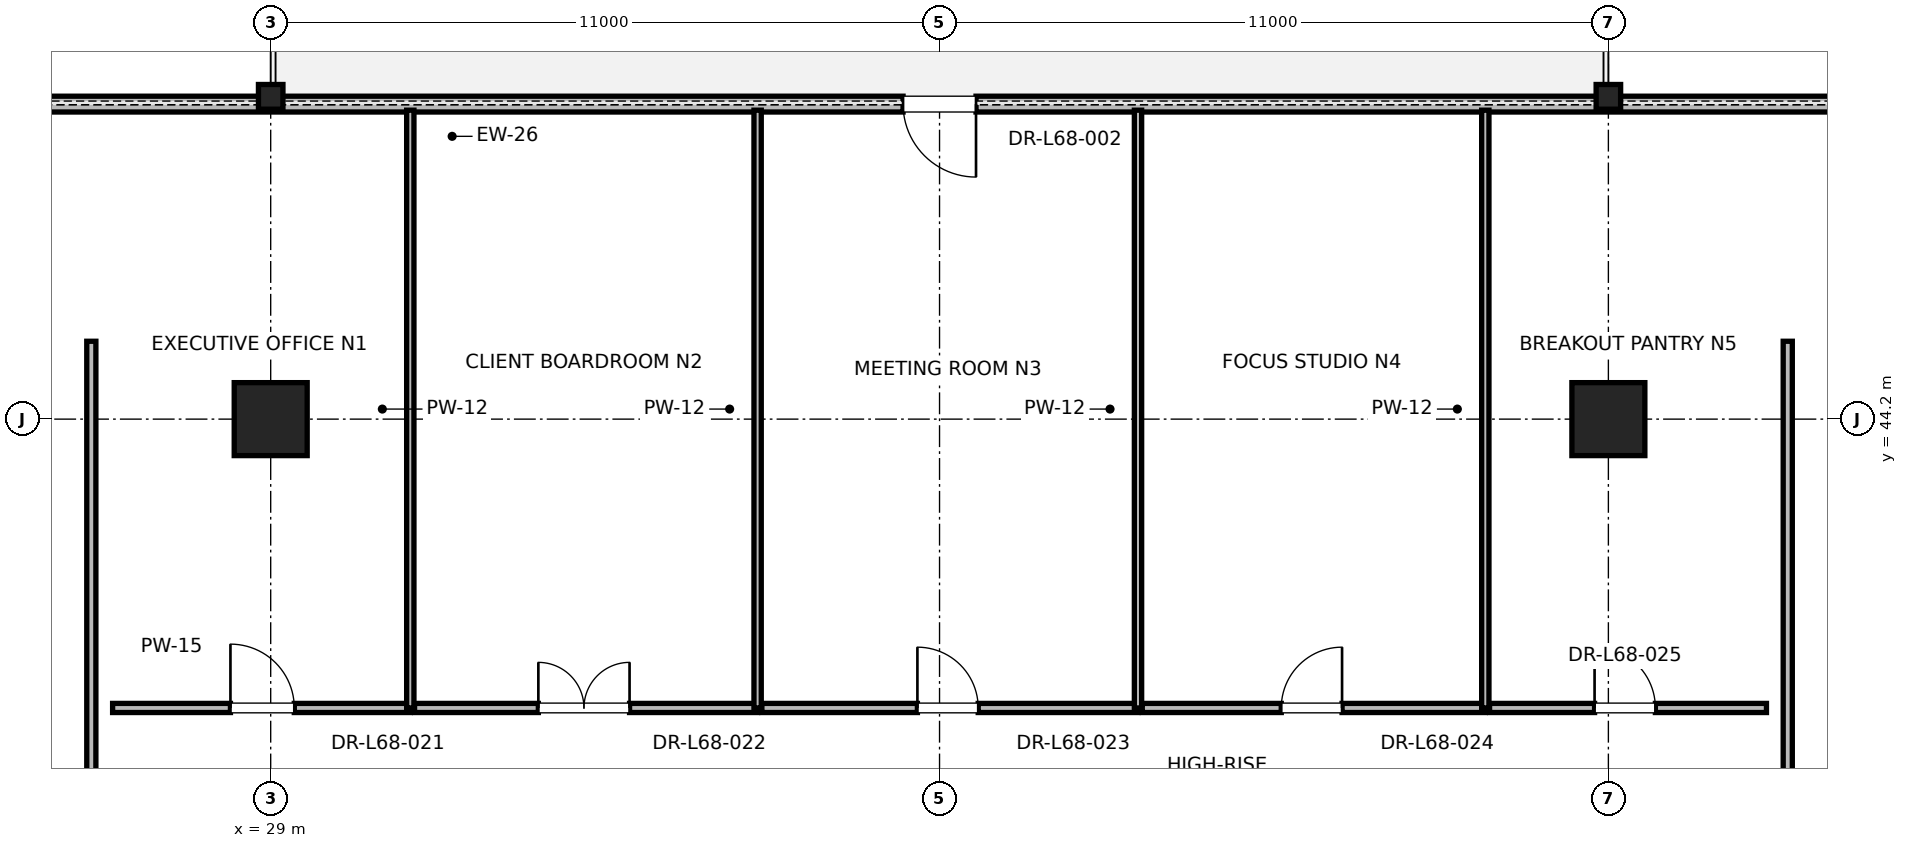
"""IFC4 building model, lengths in metres.
Left out: names, types, materials, properties, quantities, classifications, styles, units other than length and angle.
Written with IfcOpenShell. Run it as: python <this file> out.ifc"""

import sys

from ifc_helpers import new_model, si_unit, direction, frame, frame_2d, origin, origin_2d, place, context, subcontext, project, spatial, rectangle, i_section, extrude, element, fill, save


model = new_model("IFC4")
c1 = context("Model", 3, precision=1e-05, world=origin(), true_north=direction((0.0, 1.0)))
c2 = subcontext(c1, "Body", "Model", "MODEL_VIEW")
j1 = project(units=[si_unit("LENGTHUNIT", "METRE"), si_unit("PLANEANGLEUNIT", "RADIAN")], contexts=[c1])
p1 = place(None, origin())
s1 = spatial("IfcSite", under=j1, at=p1, CompositionType="ELEMENT")
p2 = place(p1, origin())
s2 = spatial("IfcBuilding", under=s1, at=p2, CompositionType="ELEMENT")
p3 = place(p2, frame((0.0, 0.0, 291.2)))
s3 = spatial("IfcBuildingStorey", under=s2, at=p3, CompositionType="ELEMENT", Elevation=291.2)
for number, where, z_axis, x_axis in (
    (1, (29.0, 44.2, 0.0), (0.0, 0.0, 1.0), (1.0, 0.0, 0.0)),
    (2, (51.0, 44.2, 0.0), (0.0, 0.0, 1.0), (1.0, 0.0, 0.0)),
):
    element("IfcColumn", number, at=place(p3, frame(where, z_axis=z_axis, x_axis=x_axis)), inside=s3, PredefinedType="COLUMN", context=c2, shape_type="SweptSolid", body=[
        extrude(rectangle(XDim=1.2, YDim=1.2, at=origin_2d()), origin(), (0.0, 0.0, 1.0), 4.0),
    ])
for number, where, z_axis, x_axis in (
    (3, (29.0, 49.5, 0.0), (0.0, 0.0, 1.0), (1.0, 0.0, 0.0)),
    (4, (51.0, 49.5, 0.0), (0.0, 0.0, 1.0), (1.0, 0.0, 0.0)),
):
    element("IfcColumn", number, at=place(p3, frame(where, z_axis=z_axis, x_axis=x_axis)), inside=s3, PredefinedType="COLUMN", context=c2, shape_type="SweptSolid", body=[
        extrude(i_section(OverallWidth=0.403, OverallDepth=0.406, WebThickness=0.027, FlangeThickness=0.043, FilletRadius=0.015, at=origin_2d()), origin(), (0.0, 0.0, 1.0), 4.0),
    ])
p4 = place(p3, frame((61.232, 49.381, 0.0), z_axis=(0.0, 0.0, 1.0), x_axis=(-1.0, 0.0, 0.0)))
e5 = element("IfcWall", 5, at=p4, inside=s3, PredefinedType="PARAPET", context=c2, shape_type="SweptSolid", body=[
    extrude(rectangle(XDim=42.463, YDim=0.26, at=frame_2d((21.232, 0.0))), origin(), (0.0, 0.0, 1.0), 2.753),
])
p5 = place(p4, frame((4.2, 0.0, 0.85)))
e6 = element("IfcOpeningElement", 6, at=p5, cuts=e5, PredefinedType="OPENING", context=c2, shape_type="SweptSolid", body=[
    extrude(rectangle(XDim=1.6, YDim=2.1, at=frame_2d((0.8, 1.05))), frame((0.0, 0.13, 0.0), z_axis=(0.0, -1.0, 0.0), x_axis=(1.0, 0.0, 0.0)), (0.0, 0.0, 1.0), 0.26),
])
p6 = place(p4, frame((20.632, 0.0, 0.0)))
e7 = element("IfcOpeningElement", 7, at=p6, cuts=e5, PredefinedType="OPENING", context=c2, shape_type="SweptSolid", body=[
    extrude(rectangle(XDim=1.2, YDim=2.2, at=frame_2d((0.6, 1.1))), frame((0.0, 0.13, 0.0), z_axis=(0.0, -1.0, 0.0), x_axis=(1.0, 0.0, 0.0)), (0.0, 0.0, 1.0), 0.26),
])
p7 = place(p4, frame((36.663, 0.0, 0.85)))
e8 = element("IfcOpeningElement", 8, at=p7, cuts=e5, PredefinedType="OPENING", context=c2, shape_type="SweptSolid", body=[
    extrude(rectangle(XDim=1.6, YDim=2.1, at=frame_2d((0.8, 1.05))), frame((0.0, 0.13, 0.0), z_axis=(0.0, -1.0, 0.0), x_axis=(1.0, 0.0, 0.0)), (0.0, 0.0, 1.0), 0.26),
])
p8 = place(p3, frame((26.4, 39.45, 0.0), z_axis=(0.0, 0.0, 1.0), x_axis=(1.0, 0.0, 0.0)))
e9 = element("IfcWall", 9, at=p8, inside=s3, PredefinedType="PARTITIONING", context=c2, shape_type="SweptSolid", body=[
    extrude(rectangle(XDim=4.896, YDim=0.15, at=frame_2d((2.448, 0.0))), origin(), (0.0, 0.0, 1.0), 2.753),
])
p9 = place(p8, frame((1.938, 0.0, 0.0)))
e10 = element("IfcOpeningElement", 10, at=p9, cuts=e9, PredefinedType="OPENING", context=c2, shape_type="SweptSolid", body=[
    extrude(rectangle(XDim=1.05, YDim=2.2, at=frame_2d((0.525, 1.1))), frame((0.0, 0.075, 0.0), z_axis=(0.0, -1.0, 0.0), x_axis=(1.0, 0.0, 0.0)), (0.0, 0.0, 1.0), 0.15),
])
p10 = place(p3, frame((31.296, 39.45, 0.0), z_axis=(0.0, 0.0, 1.0), x_axis=(0.0, 1.0, 0.0)))
e11 = element("IfcWall", 11, at=p10, inside=s3, PredefinedType="PARTITIONING", context=c2, shape_type="SweptSolid", body=[
    extrude(rectangle(XDim=9.831, YDim=0.12, at=frame_2d((4.915, 0.0))), origin(), (0.0, 0.0, 1.0), 2.33),
])
p11 = place(p3, frame((31.366, 39.45, 0.0), z_axis=(0.0, 0.0, 1.0), x_axis=(1.0, 0.0, 0.0)))
e12 = element("IfcWall", 12, at=p11, inside=s3, PredefinedType="PARTITIONING", context=c2, shape_type="SweptSolid", body=[
    extrude(rectangle(XDim=5.642, YDim=0.15, at=frame_2d((2.821, 0.0))), origin(), (0.0, 0.0, 1.0), 2.85),
])
p12 = place(p11, frame((2.036, 0.0, 0.0)))
e13 = element("IfcOpeningElement", 13, at=p12, cuts=e12, PredefinedType="OPENING", context=c2, shape_type="SweptSolid", body=[
    extrude(rectangle(XDim=1.5, YDim=2.25, at=frame_2d((0.75, 1.125))), frame((0.0, 0.075, 0.0), z_axis=(0.0, -1.0, 0.0), x_axis=(1.0, 0.0, 0.0)), (0.0, 0.0, 1.0), 0.15),
])
p13 = place(p3, frame((37.008, 39.45, 0.0), z_axis=(0.0, 0.0, 1.0), x_axis=(0.0, 1.0, 0.0)))
e14 = element("IfcWall", 14, at=p13, inside=s3, PredefinedType="PARTITIONING", context=c2, shape_type="SweptSolid", body=[
    extrude(rectangle(XDim=9.831, YDim=0.12, at=frame_2d((4.915, 0.0))), origin(), (0.0, 0.0, 1.0), 2.33),
])
p14 = place(p3, frame((37.078, 39.45, 0.0), z_axis=(0.0, 0.0, 1.0), x_axis=(1.0, 0.0, 0.0)))
e15 = element("IfcWall", 15, at=p14, inside=s3, PredefinedType="PARTITIONING", context=c2, shape_type="SweptSolid", body=[
    extrude(rectangle(XDim=6.186, YDim=0.15, at=frame_2d((3.093, 0.0))), origin(), (0.0, 0.0, 1.0), 2.85),
])
p15 = place(p14, frame((2.558, 0.0, 0.0)))
e16 = element("IfcOpeningElement", 16, at=p15, cuts=e15, PredefinedType="OPENING", context=c2, shape_type="SweptSolid", body=[
    extrude(rectangle(XDim=1.0, YDim=2.15, at=frame_2d((0.5, 1.075))), frame((0.0, 0.075, 0.0), z_axis=(0.0, -1.0, 0.0), x_axis=(1.0, 0.0, 0.0)), (0.0, 0.0, 1.0), 0.15),
])
p16 = place(p3, frame((43.264, 39.45, 0.0), z_axis=(0.0, 0.0, 1.0), x_axis=(0.0, 1.0, 0.0)))
e17 = element("IfcWall", 17, at=p16, inside=s3, PredefinedType="PARTITIONING", context=c2, shape_type="SweptSolid", body=[
    extrude(rectangle(XDim=9.831, YDim=0.12, at=frame_2d((4.915, 0.0))), origin(), (0.0, 0.0, 1.0), 2.33),
])
p17 = place(p3, frame((43.334, 39.45, 0.0), z_axis=(0.0, 0.0, 1.0), x_axis=(1.0, 0.0, 0.0)))
e18 = element("IfcWall", 18, at=p17, inside=s3, PredefinedType="PARTITIONING", context=c2, shape_type="SweptSolid", body=[
    extrude(rectangle(XDim=5.642, YDim=0.15, at=frame_2d((2.821, 0.0))), origin(), (0.0, 0.0, 1.0), 2.85),
])
p18 = place(p17, frame((2.286, 0.0, 0.0)))
e19 = element("IfcOpeningElement", 19, at=p18, cuts=e18, PredefinedType="OPENING", context=c2, shape_type="SweptSolid", body=[
    extrude(rectangle(XDim=1.0, YDim=2.15, at=frame_2d((0.5, 1.075))), frame((0.0, 0.075, 0.0), z_axis=(0.0, -1.0, 0.0), x_axis=(1.0, 0.0, 0.0)), (0.0, 0.0, 1.0), 0.15),
])
p19 = place(p3, frame((48.976, 39.45, 0.0), z_axis=(0.0, 0.0, 1.0), x_axis=(0.0, 1.0, 0.0)))
e20 = element("IfcWall", 20, at=p19, inside=s3, PredefinedType="PARTITIONING", context=c2, shape_type="SweptSolid", body=[
    extrude(rectangle(XDim=9.831, YDim=0.12, at=frame_2d((4.915, 0.0))), origin(), (0.0, 0.0, 1.0), 2.33),
])
p20 = place(p3, frame((49.046, 39.45, 0.0), z_axis=(0.0, 0.0, 1.0), x_axis=(1.0, 0.0, 0.0)))
e21 = element("IfcWall", 21, at=p20, inside=s3, PredefinedType="PARTITIONING", context=c2, shape_type="SweptSolid", body=[
    extrude(rectangle(XDim=4.554, YDim=0.15, at=frame_2d((2.277, 0.0))), origin(), (0.0, 0.0, 1.0), 2.753),
])
p21 = place(p20, frame((1.727, 0.0, 0.0)))
e22 = element("IfcOpeningElement", 22, at=p21, cuts=e21, PredefinedType="OPENING", context=c2, shape_type="SweptSolid", body=[
    extrude(rectangle(XDim=1.0, YDim=2.15, at=frame_2d((0.5, 1.075))), frame((0.0, 0.075, 0.0), z_axis=(0.0, -1.0, 0.0), x_axis=(1.0, 0.0, 0.0)), (0.0, 0.0, 1.0), 0.15),
])
p22 = place(p3, frame((26.05, 34.403, 0.0), z_axis=(0.0, 0.0, 1.0), x_axis=(0.0, 1.0, 0.0)))
e23 = element("IfcWall", 23, at=p22, inside=s3, PredefinedType="PARTITIONING", context=c2, shape_type="SweptSolid", body=[
    extrude(rectangle(XDim=11.078, YDim=0.15, at=frame_2d((5.539, 0.0))), origin(), (0.0, 0.0, 1.0), 2.753),
])
p23 = place(p22, frame((0.474, 0.0, 0.0)))
e24 = element("IfcOpeningElement", 24, at=p23, cuts=e23, PredefinedType="OPENING", context=c2, shape_type="SweptSolid", body=[
    extrude(rectangle(XDim=1.05, YDim=2.2, at=frame_2d((0.525, 1.1))), frame((0.0, 0.075, 0.0), z_axis=(0.0, -1.0, 0.0), x_axis=(1.0, 0.0, 0.0)), (0.0, 0.0, 1.0), 0.15),
])
p24 = place(p3, frame((53.95, 24.693, 0.0), z_axis=(0.0, 0.0, 1.0), x_axis=(0.0, 1.0, 0.0)))
e25 = element("IfcWall", 25, at=p24, inside=s3, PredefinedType="PARTITIONING", context=c2, shape_type="SweptSolid", body=[
    extrude(rectangle(XDim=20.788, YDim=0.15, at=frame_2d((10.394, 0.0))), origin(), (0.0, 0.0, 1.0), 2.753),
])
p25 = place(p24, frame((5.354, 0.0, 0.0)))
e26 = element("IfcOpeningElement", 26, at=p25, cuts=e25, PredefinedType="OPENING", context=c2, shape_type="SweptSolid", body=[
    extrude(rectangle(XDim=1.0, YDim=2.15, at=frame_2d((0.5, 1.075))), frame((0.0, 0.075, 0.0), z_axis=(0.0, -1.0, 0.0), x_axis=(1.0, 0.0, 0.0)), (0.0, 0.0, 1.0), 0.15),
])
p26 = place(p6, origin())
e27 = element("IfcDoor", 27, at=p26, inside=s3, OperationType="SINGLE_SWING_LEFT", PredefinedType="DOOR", context=c2, shape_type="SweptSolid", body=[
    extrude(rectangle(XDim=1.2, YDim=2.2, at=frame_2d((0.6, 1.1))), frame((0.0, 0.025, 0.0), z_axis=(0.0, -1.0, 0.0), x_axis=(1.0, 0.0, 0.0)), (0.0, 0.0, 1.0), 0.05),
])
fill(e7, e27)
p27 = place(p9, origin())
e28 = element("IfcDoor", 28, at=p27, inside=s3, OperationType="SINGLE_SWING_LEFT", PredefinedType="DOOR", context=c2, shape_type="SweptSolid", body=[
    extrude(rectangle(XDim=1.05, YDim=2.2, at=frame_2d((0.525, 1.1))), frame((0.0, 0.025, 0.0), z_axis=(0.0, -1.0, 0.0), x_axis=(1.0, 0.0, 0.0)), (0.0, 0.0, 1.0), 0.05),
])
fill(e10, e28)
p28 = place(p12, origin())
e29 = element("IfcDoor", 29, at=p28, inside=s3, OperationType="DOUBLE_DOOR_SINGLE_SWING", PredefinedType="DOOR", context=c2, shape_type="SweptSolid", body=[
    extrude(rectangle(XDim=1.5, YDim=2.25, at=frame_2d((0.75, 1.125))), frame((0.0, 0.025, 0.0), z_axis=(0.0, -1.0, 0.0), x_axis=(1.0, 0.0, 0.0)), (0.0, 0.0, 1.0), 0.05),
])
fill(e13, e29)
p29 = place(p15, origin())
e30 = element("IfcDoor", 30, at=p29, inside=s3, OperationType="SINGLE_SWING_LEFT", PredefinedType="DOOR", context=c2, shape_type="SweptSolid", body=[
    extrude(rectangle(XDim=1.0, YDim=2.15, at=frame_2d((0.5, 1.075))), frame((0.0, 0.025, 0.0), z_axis=(0.0, -1.0, 0.0), x_axis=(1.0, 0.0, 0.0)), (0.0, 0.0, 1.0), 0.05),
])
fill(e16, e30)
p30 = place(p18, origin())
e31 = element("IfcDoor", 31, at=p30, inside=s3, OperationType="SINGLE_SWING_RIGHT", PredefinedType="DOOR", context=c2, shape_type="SweptSolid", body=[
    extrude(rectangle(XDim=1.0, YDim=2.15, at=frame_2d((0.5, 1.075))), frame((0.0, 0.025, 0.0), z_axis=(0.0, -1.0, 0.0), x_axis=(1.0, 0.0, 0.0)), (0.0, 0.0, 1.0), 0.05),
])
fill(e19, e31)
p31 = place(p21, origin())
e32 = element("IfcDoor", 32, at=p31, inside=s3, OperationType="SINGLE_SWING_LEFT", PredefinedType="DOOR", context=c2, shape_type="SweptSolid", body=[
    extrude(rectangle(XDim=1.0, YDim=2.15, at=frame_2d((0.5, 1.075))), frame((0.0, 0.025, 0.0), z_axis=(0.0, -1.0, 0.0), x_axis=(1.0, 0.0, 0.0)), (0.0, 0.0, 1.0), 0.05),
])
fill(e22, e32)
save(model, sys.argv[1])
